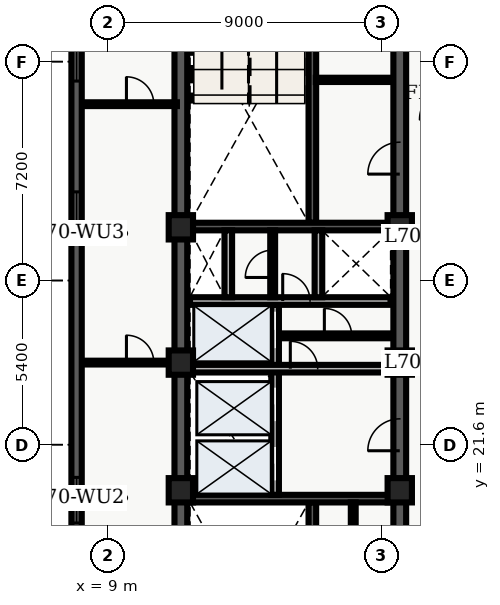
"""IFC4 building model, lengths in metres.
Left out: names, types, materials, properties, quantities, classifications, styles, units other than length and angle.
Written with IfcOpenShell. Run it as: python <this file> out.ifc"""

import sys

from ifc_helpers import new_model, entity, si_unit, converted_unit, direction, frame, origin_with_axes, origin_2d_with_axis, place, context, subcontext, project, spatial, polyline, rectangle, outline, extrude, element, fill, save


model = new_model("IFC4")
c1 = context("Model", 3, precision=1e-05, world=origin_with_axes(), true_north=direction((0.0, 1.0)))
c2 = subcontext(c1, "Body", "Model", "MODEL_VIEW")
j1 = project(units=[si_unit("LENGTHUNIT", "METRE"), converted_unit("PLANEANGLEUNIT", "DEGREE", entity("IfcPlaneAngleMeasure", 0.017), si_unit("PLANEANGLEUNIT", "RADIAN"), dimensions=[0, 0, 0, 0, 0, 0, 0])], contexts=[c1])
p1 = place(None, origin_with_axes())
s1 = spatial("IfcSite", under=j1, at=p1, CompositionType="ELEMENT")
p2 = place(p1, origin_with_axes())
s2 = spatial("IfcBuilding", under=s1, at=p2, CompositionType="ELEMENT")
p3 = place(p2, frame((0.0, 0.0, 284.1), z_axis=(0.0, 0.0, 1.0), x_axis=(1.0, 0.0, 0.0)))
s3 = spatial("IfcBuildingStorey", under=s2, at=p3, CompositionType="ELEMENT", Elevation=284.1)
p4 = place(p3, frame((11.4, 10.8, 0.0), z_axis=(0.0, 0.0, 1.0), x_axis=(0.0, 1.0, 0.0)))
e1 = element("IfcWall", 1, at=p4, inside=s3, PredefinedType="SHEAR", context=c2, shape_type="SweptSolid", body=[
    extrude(outline(polyline([(0.0, -0.21), (27.0, -0.21), (27.0, 0.21), (0.0, 0.21), (0.0, -0.21)])), origin_with_axes(), (0.0, 0.0, 1.0), 3.6),
])
p5 = place(p3, frame((18.6, 10.8, 0.0), z_axis=(0.0, 0.0, 1.0), x_axis=(0.0, 1.0, 0.0)))
e2 = element("IfcWall", 2, at=p5, inside=s3, PredefinedType="SHEAR", context=c2, shape_type="SweptSolid", body=[
    extrude(outline(polyline([(0.0, -0.21), (13.5, -0.21), (13.5, 0.21), (0.0, 0.21), (0.0, -0.21)])), origin_with_axes(), (0.0, 0.0, 1.0), 3.6),
])
p6 = place(p5, frame((1.3, 0.0, 0.0), z_axis=(0.0, 0.0, 1.0), x_axis=(1.0, 0.0, 0.0)))
e3 = element("IfcOpeningElement", 3, at=p6, cuts=e2, PredefinedType="OPENING", context=c2, shape_type="SweptSolid", body=[
    extrude(rectangle(XDim=1.1, YDim=0.44, at=origin_2d_with_axis()), origin_with_axes(), (0.0, 0.0, 1.0), 2.15),
])
p7 = place(p5, frame((3.4, 0.0, 0.0), z_axis=(0.0, 0.0, 1.0), x_axis=(1.0, 0.0, 0.0)))
e4 = element("IfcOpeningElement", 4, at=p7, cuts=e2, PredefinedType="OPENING", context=c2, shape_type="SweptSolid", body=[
    extrude(rectangle(XDim=1.1, YDim=0.44, at=origin_2d_with_axis()), origin_with_axes(), (0.0, 0.0, 1.0), 2.15),
])
p8 = place(p5, frame((11.125, 0.0, 0.0), z_axis=(0.0, 0.0, 1.0), x_axis=(1.0, 0.0, 0.0)))
e5 = element("IfcOpeningElement", 5, at=p8, cuts=e2, PredefinedType="OPENING", context=c2, shape_type="SweptSolid", body=[
    extrude(rectangle(XDim=1.05, YDim=0.44, at=origin_2d_with_axis()), origin_with_axes(), (0.0, 0.0, 1.0), 2.15),
])
p9 = place(p5, frame((6.675, 0.0, 0.0), z_axis=(0.0, 0.0, 1.0), x_axis=(1.0, 0.0, 0.0)))
e6 = element("IfcOpeningElement", 6, at=p9, cuts=e2, PredefinedType="OPENING", context=c2, shape_type="SweptSolid", body=[
    extrude(rectangle(XDim=0.95, YDim=0.44, at=origin_2d_with_axis()), origin_with_axes(), (0.0, 0.0, 1.0), 2.15),
])
p10 = place(p3, frame((18.6, 24.3, 0.0), z_axis=(0.0, 0.0, 1.0), x_axis=(0.0, 1.0, 0.0)))
e7 = element("IfcWall", 7, at=p10, inside=s3, PredefinedType="SHEAR", context=c2, shape_type="SweptSolid", body=[
    extrude(outline(polyline([(0.0, -0.21), (13.5, -0.21), (13.5, 0.21), (0.0, 0.21), (0.0, -0.21)])), origin_with_axes(), (0.0, 0.0, 1.0), 3.6),
])
p11 = place(p10, frame((6.725, 0.0, 0.0), z_axis=(0.0, 0.0, 1.0), x_axis=(1.0, 0.0, 0.0)))
e8 = element("IfcOpeningElement", 8, at=p11, cuts=e7, PredefinedType="OPENING", context=c2, shape_type="SweptSolid", body=[
    extrude(rectangle(XDim=1.05, YDim=0.44, at=origin_2d_with_axis()), origin_with_axes(), (0.0, 0.0, 1.0), 2.15),
])
p12 = place(p10, frame((11.125, 0.0, 0.0), z_axis=(0.0, 0.0, 1.0), x_axis=(1.0, 0.0, 0.0)))
e9 = element("IfcOpeningElement", 9, at=p12, cuts=e7, PredefinedType="OPENING", context=c2, shape_type="SweptSolid", body=[
    extrude(rectangle(XDim=1.05, YDim=0.44, at=origin_2d_with_axis()), origin_with_axes(), (0.0, 0.0, 1.0), 2.15),
])
p13 = place(p3, frame((15.725, 11.01, 0.0), z_axis=(0.0, 0.0, 1.0), x_axis=(0.0, 1.0, 0.0)))
e10 = element("IfcWall", 10, at=p13, inside=s3, PredefinedType="SHEAR", context=c2, shape_type="SweptSolid", body=[
    extrude(outline(polyline([(0.0, -0.125), (8.69, -0.125), (8.69, 0.125), (0.0, 0.125), (0.0, -0.125)])), origin_with_axes(), (0.0, 0.0, 1.0), 3.6),
])
p14 = place(p3, frame((11.61, 19.825, 0.0), z_axis=(0.0, 0.0, 1.0), x_axis=(1.0, 0.0, 0.0)))
e11 = element("IfcWall", 11, at=p14, inside=s3, PredefinedType="SHEAR", context=c2, shape_type="SweptSolid", body=[
    extrude(outline(polyline([(0.0, -0.125), (6.78, -0.125), (6.78, 0.125), (0.0, 0.125), (0.0, -0.125)])), origin_with_axes(), (0.0, 0.0, 1.0), 3.6),
])
p15 = place(p3, frame((15.725, 28.9, 0.0), z_axis=(0.0, 0.0, 1.0), x_axis=(0.0, 1.0, 0.0)))
e12 = element("IfcWall", 12, at=p15, inside=s3, PredefinedType="SHEAR", context=c2, shape_type="SweptSolid", body=[
    extrude(outline(polyline([(0.0, -0.125), (8.69, -0.125), (8.69, 0.125), (0.0, 0.125), (0.0, -0.125)])), origin_with_axes(), (0.0, 0.0, 1.0), 3.6),
])
p16 = place(p3, frame((11.61, 28.775, 0.0), z_axis=(0.0, 0.0, 1.0), x_axis=(1.0, 0.0, 0.0)))
e13 = element("IfcWall", 13, at=p16, inside=s3, PredefinedType="SHEAR", context=c2, shape_type="SweptSolid", body=[
    extrude(outline(polyline([(0.0, -0.125), (6.78, -0.125), (6.78, 0.125), (0.0, 0.125), (0.0, -0.125)])), origin_with_axes(), (0.0, 0.0, 1.0), 3.6),
])
p17 = place(p3, frame((14.5, 19.95, 0.0), z_axis=(0.0, 0.0, 1.0), x_axis=(0.0, 1.0, 0.0)))
e14 = element("IfcWall", 14, at=p17, inside=s3, PredefinedType="SOLIDWALL", context=c2, shape_type="SweptSolid", body=[
    extrude(outline(polyline([(0.0, -0.125), (6.25, -0.125), (6.25, 0.125), (0.0, 0.125), (0.0, -0.125)])), origin_with_axes(), (0.0, 0.0, 1.0), 2.64),
])
p18 = place(p17, frame((1.025, 0.0, 0.0), z_axis=(0.0, 0.0, 1.0), x_axis=(1.0, 0.0, 0.0)))
e15 = element("IfcOpeningElement", 15, at=p18, cuts=e14, PredefinedType="OPENING", context=c2, shape_type="SweptSolid", body=[
    extrude(rectangle(XDim=1.1, YDim=0.27, at=origin_2d_with_axis()), origin_with_axes(), (0.0, 0.0, 1.0), 2.15),
])
p19 = place(p17, frame((2.975, 0.0, 0.0), z_axis=(0.0, 0.0, 1.0), x_axis=(1.0, 0.0, 0.0)))
e16 = element("IfcOpeningElement", 16, at=p19, cuts=e14, PredefinedType="OPENING", context=c2, shape_type="SweptSolid", body=[
    extrude(rectangle(XDim=1.1, YDim=0.27, at=origin_2d_with_axis()), origin_with_axes(), (0.0, 0.0, 1.0), 2.15),
])
p20 = place(p17, frame((5.425, 0.0, 0.0), z_axis=(0.0, 0.0, 1.0), x_axis=(1.0, 0.0, 0.0)))
e17 = element("IfcOpeningElement", 17, at=p20, cuts=e14, PredefinedType="OPENING", context=c2, shape_type="SweptSolid", body=[
    extrude(rectangle(XDim=1.2, YDim=0.27, at=origin_2d_with_axis()), origin_with_axes(), (0.0, 0.0, 1.0), 2.15),
])
p21 = place(p3, frame((11.7, 24.1, 0.0), z_axis=(0.0, 0.0, 1.0), x_axis=(1.0, 0.0, 0.0)))
e18 = element("IfcWall", 18, at=p21, inside=s3, PredefinedType="SOLIDWALL", context=c2, shape_type="SweptSolid", body=[
    extrude(outline(polyline([(0.0, -0.125), (6.6, -0.125), (6.6, 0.125), (0.0, 0.125), (0.0, -0.125)])), origin_with_axes(), (0.0, 0.0, 1.0), 2.64),
])
p22 = place(p21, frame((3.75, 0.0, 0.0), z_axis=(0.0, 0.0, 1.0), x_axis=(1.0, 0.0, 0.0)))
e19 = element("IfcOpeningElement", 19, at=p22, cuts=e18, PredefinedType="OPENING", context=c2, shape_type="SweptSolid", body=[
    extrude(rectangle(XDim=0.9, YDim=0.27, at=origin_2d_with_axis()), origin_with_axes(), (0.0, 0.0, 1.0), 2.15),
])
p23 = place(p3, frame((11.7, 26.325, 0.0), z_axis=(0.0, 0.0, 1.0), x_axis=(1.0, 0.0, 0.0)))
e20 = element("IfcWall", 20, at=p23, inside=s3, PredefinedType="SOLIDWALL", context=c2, shape_type="SweptSolid", body=[
    extrude(outline(polyline([(0.0, -0.125), (6.6, -0.125), (6.6, 0.125), (0.0, 0.125), (0.0, -0.125)])), origin_with_axes(), (0.0, 0.0, 1.0), 2.64),
])
p24 = place(p23, frame((3.5, 0.0, 0.0), z_axis=(0.0, 0.0, 1.0), x_axis=(1.0, 0.0, 0.0)))
e21 = element("IfcOpeningElement", 21, at=p24, cuts=e20, PredefinedType="OPENING", context=c2, shape_type="SweptSolid", body=[
    extrude(rectangle(XDim=0.9, YDim=0.27, at=origin_2d_with_axis()), origin_with_axes(), (0.0, 0.0, 1.0), 2.15),
])
for number, where, z_axis, x_axis in (
    (22, (12.96, 26.45, 0.0), (0.0, 0.0, 1.0), (0.0, 1.0, 0.0)),
    (23, (15.925, 26.45, 0.0), (0.0, 0.0, 1.0), (0.0, 1.0, 0.0)),
):
    element("IfcWall", number, at=place(p3, frame(where, z_axis=z_axis, x_axis=x_axis)), inside=s3, PredefinedType="SOLIDWALL", context=c2, shape_type="SweptSolid", body=[
        extrude(outline(polyline([(0.0, -0.125), (2.2, -0.125), (2.2, 0.125), (0.0, 0.125), (0.0, -0.125)])), origin_with_axes(), (0.0, 0.0, 1.0), 2.64),
    ])
for number, where, z_axis, x_axis in (
    (24, (11.4, 20.1, 0.0), (0.0, 0.0, 1.0), (1.0, 0.0, 0.0)),
    (25, (11.4, 24.3, 0.0), (0.0, 0.0, 1.0), (1.0, 0.0, 0.0)),
    (26, (11.4, 28.75, 0.0), (0.0, 0.0, 1.0), (1.0, 0.0, 0.0)),
    (27, (18.6, 20.1, 0.0), (0.0, 0.0, 1.0), (1.0, 0.0, 0.0)),
    (28, (18.6, 24.3, 0.0), (0.0, 0.0, 1.0), (1.0, 0.0, 0.0)),
    (29, (18.6, 28.75, 0.0), (0.0, 0.0, 1.0), (1.0, 0.0, 0.0)),
):
    element("IfcColumn", number, at=place(p3, frame(where, z_axis=z_axis, x_axis=x_axis)), inside=s3, PredefinedType="COLUMN", context=c2, shape_type="SweptSolid", body=[
        extrude(rectangle(XDim=0.8, YDim=0.8, at=origin_2d_with_axis()), origin_with_axes(), (0.0, 0.0, 1.0), 3.9),
    ])
p25 = place(p3, frame((14.62, 25.18, 0.0), z_axis=(0.0, 0.0, 1.0), x_axis=(1.0, 0.0, 0.0)))
e30 = element("IfcWall", 30, at=p25, inside=s3, PredefinedType="PARTITIONING", context=c2, shape_type="SweptSolid", body=[
    extrude(outline(polyline([(0.0, -0.08), (3.68, -0.08), (3.68, 0.08), (0.0, 0.08), (0.0, -0.08)])), origin_with_axes(), (0.0, 0.0, 1.0), 2.64),
])
p26 = place(p25, frame((1.95, 0.0, 0.0), z_axis=(0.0, 0.0, 1.0), x_axis=(1.0, 0.0, 0.0)))
e31 = element("IfcOpeningElement", 31, at=p26, cuts=e30, PredefinedType="OPENING", context=c2, shape_type="SweptSolid", body=[
    extrude(rectangle(XDim=0.9, YDim=0.18, at=origin_2d_with_axis()), origin_with_axes(), (0.0, 0.0, 1.0), 2.15),
])
p27 = place(p3, frame((14.42, 26.45, 0.0), z_axis=(0.0, 0.0, 1.0), x_axis=(0.0, 1.0, 0.0)))
e32 = element("IfcWall", 32, at=p27, inside=s3, PredefinedType="PARTITIONING", context=c2, shape_type="SweptSolid", body=[
    extrude(outline(polyline([(0.0, -0.08), (2.2, -0.08), (2.2, 0.08), (0.0, 0.08), (0.0, -0.08)])), origin_with_axes(), (0.0, 0.0, 1.0), 2.64),
])
p28 = place(p27, frame((1.1, 0.0, 0.0), z_axis=(0.0, 0.0, 1.0), x_axis=(1.0, 0.0, 0.0)))
e33 = element("IfcOpeningElement", 33, at=p28, cuts=e32, PredefinedType="OPENING", context=c2, shape_type="SweptSolid", body=[
    extrude(rectangle(XDim=0.9, YDim=0.18, at=origin_2d_with_axis()), origin_with_axes(), (0.0, 0.0, 1.0), 2.15),
])
p29 = place(p3, frame((17.07, 15.34, 0.0), z_axis=(0.0, 0.0, 1.0), x_axis=(0.0, 1.0, 0.0)))
e34 = element("IfcWall", 34, at=p29, inside=s3, PredefinedType="PARTITIONING", context=c2, shape_type="SweptSolid", body=[
    extrude(outline(polyline([(0.0, -0.08), (4.36, -0.08), (4.36, 0.08), (0.0, 0.08), (0.0, -0.08)])), origin_with_axes(), (0.0, 0.0, 1.0), 2.64),
])
p30 = place(p29, frame((2.05, 0.0, 0.0), z_axis=(0.0, 0.0, 1.0), x_axis=(1.0, 0.0, 0.0)))
e35 = element("IfcOpeningElement", 35, at=p30, cuts=e34, PredefinedType="OPENING", context=c2, shape_type="SweptSolid", body=[
    extrude(rectangle(XDim=0.9, YDim=0.18, at=origin_2d_with_axis()), origin_with_axes(), (0.0, 0.0, 1.0), 2.15),
])
p31 = place(p3, frame((15.84, 33.6, 0.0), z_axis=(0.0, 0.0, 1.0), x_axis=(1.0, 0.0, 0.0)))
e36 = element("IfcWall", 36, at=p31, inside=s3, PredefinedType="PARTITIONING", context=c2, shape_type="SweptSolid", body=[
    extrude(outline(polyline([(0.0, -0.07), (2.46, -0.07), (2.46, 0.07), (0.0, 0.07), (0.0, -0.07)])), origin_with_axes(), (0.0, 0.0, 1.0), 2.64),
])
p32 = place(p3, frame((8.135, 24.3, 0.0), z_axis=(0.0, 0.0, 1.0), x_axis=(1.0, 0.0, 0.0)))
e37 = element("IfcWall", 37, at=p32, inside=s3, PredefinedType="PARTITIONING", context=c2, shape_type="SweptSolid", body=[
    extrude(outline(polyline([(0.0, -0.062), (3.135, -0.062), (3.135, 0.062), (0.0, 0.062), (0.0, -0.062)])), origin_with_axes(), (0.0, 0.0, 1.0), 2.64),
])
p33 = place(p32, frame((1.925, 0.0, 0.0), z_axis=(0.0, 0.0, 1.0), x_axis=(1.0, 0.0, 0.0)))
e38 = element("IfcOpeningElement", 38, at=p33, cuts=e37, PredefinedType="OPENING", context=c2, shape_type="SweptSolid", body=[
    extrude(rectangle(XDim=0.9, YDim=0.145, at=origin_2d_with_axis()), origin_with_axes(), (0.0, 0.0, 1.0), 2.15),
])
p34 = place(p3, frame((8.135, 32.8, 0.0), z_axis=(0.0, 0.0, 1.0), x_axis=(1.0, 0.0, 0.0)))
e39 = element("IfcWall", 39, at=p34, inside=s3, PredefinedType="PARTITIONING", context=c2, shape_type="SweptSolid", body=[
    extrude(outline(polyline([(0.0, -0.062), (3.135, -0.062), (3.135, 0.062), (0.0, 0.062), (0.0, -0.062)])), origin_with_axes(), (0.0, 0.0, 1.0), 2.64),
])
p35 = place(p34, frame((1.925, 0.0, 0.0), z_axis=(0.0, 0.0, 1.0), x_axis=(1.0, 0.0, 0.0)))
e40 = element("IfcOpeningElement", 40, at=p35, cuts=e39, PredefinedType="OPENING", context=c2, shape_type="SweptSolid", body=[
    extrude(rectangle(XDim=0.9, YDim=0.145, at=origin_2d_with_axis()), origin_with_axes(), (0.0, 0.0, 1.0), 2.15),
])
p36 = place(p3, frame((7.97, 2.74, 0.0), z_axis=(0.0, 0.0, 1.0), x_axis=(0.0, 1.0, 0.0)))
e41 = element("IfcWall", 41, at=p36, inside=s3, PredefinedType="SOLIDWALL", context=c2, shape_type="SweptSolid", body=[
    extrude(outline(polyline([(0.0, -0.17), (43.46, -0.17), (43.46, 0.17), (0.0, 0.17), (0.0, -0.17)])), origin_with_axes(), (0.0, 0.0, 1.0), 3.6),
])
p37 = place(p36, frame((2.948, 0.0, 0.45), z_axis=(0.0, 0.0, 1.0), x_axis=(1.0, 0.0, 0.0)))
e42 = element("IfcOpeningElement", 42, at=p37, cuts=e41, PredefinedType="OPENING", context=c2, shape_type="SweptSolid", body=[
    extrude(rectangle(XDim=1.5, YDim=0.36, at=origin_2d_with_axis()), origin_with_axes(), (0.0, 0.0, 1.0), 2.1),
])
p38 = place(p36, frame((7.643, 0.0, 0.45), z_axis=(0.0, 0.0, 1.0), x_axis=(1.0, 0.0, 0.0)))
e43 = element("IfcOpeningElement", 43, at=p38, cuts=e41, PredefinedType="OPENING", context=c2, shape_type="SweptSolid", body=[
    extrude(rectangle(XDim=1.5, YDim=0.36, at=origin_2d_with_axis()), origin_with_axes(), (0.0, 0.0, 1.0), 2.1),
])
p39 = place(p36, frame((17.034, 0.0, 0.45), z_axis=(0.0, 0.0, 1.0), x_axis=(1.0, 0.0, 0.0)))
e44 = element("IfcOpeningElement", 44, at=p39, cuts=e41, PredefinedType="OPENING", context=c2, shape_type="SweptSolid", body=[
    extrude(rectangle(XDim=1.5, YDim=0.36, at=origin_2d_with_axis()), origin_with_axes(), (0.0, 0.0, 1.0), 2.1),
])
p40 = place(p36, frame((26.426, 0.0, 0.45), z_axis=(0.0, 0.0, 1.0), x_axis=(1.0, 0.0, 0.0)))
e45 = element("IfcOpeningElement", 45, at=p40, cuts=e41, PredefinedType="OPENING", context=c2, shape_type="SweptSolid", body=[
    extrude(rectangle(XDim=1.5, YDim=0.36, at=origin_2d_with_axis()), origin_with_axes(), (0.0, 0.0, 1.0), 2.1),
])
p41 = place(p36, frame((31.571, 0.0, 0.45), z_axis=(0.0, 0.0, 1.0), x_axis=(1.0, 0.0, 0.0)))
e46 = element("IfcOpeningElement", 46, at=p41, cuts=e41, PredefinedType="OPENING", context=c2, shape_type="SweptSolid", body=[
    extrude(rectangle(XDim=1.5, YDim=0.36, at=origin_2d_with_axis()), origin_with_axes(), (0.0, 0.0, 1.0), 2.1),
])
p42 = place(p36, frame((35.817, 0.0, 0.45), z_axis=(0.0, 0.0, 1.0), x_axis=(1.0, 0.0, 0.0)))
e47 = element("IfcOpeningElement", 47, at=p42, cuts=e41, PredefinedType="OPENING", context=c2, shape_type="SweptSolid", body=[
    extrude(rectangle(XDim=1.5, YDim=0.36, at=origin_2d_with_axis()), origin_with_axes(), (0.0, 0.0, 1.0), 2.1),
])
p43 = place(p36, frame((40.512, 0.0, 0.45), z_axis=(0.0, 0.0, 1.0), x_axis=(1.0, 0.0, 0.0)))
e48 = element("IfcOpeningElement", 48, at=p43, cuts=e41, PredefinedType="OPENING", context=c2, shape_type="SweptSolid", body=[
    extrude(rectangle(XDim=1.5, YDim=0.36, at=origin_2d_with_axis()), origin_with_axes(), (0.0, 0.0, 1.0), 2.1),
])
p44 = place(p17, frame((1.025, 0.0, 0.0), z_axis=(0.0, 0.0, 1.0), x_axis=(1.0, 0.0, 0.0)))
e49 = element("IfcDoor", 49, at=p44, inside=s3, OperationType="SLIDING_TO_LEFT", PredefinedType="DOOR", context=c2, shape_type="SweptSolid", body=[
    extrude(rectangle(XDim=1.1, YDim=0.09, at=origin_2d_with_axis()), origin_with_axes(), (0.0, 0.0, 1.0), 2.15),
])
fill(e15, e49)
p45 = place(p17, frame((2.975, 0.0, 0.0), z_axis=(0.0, 0.0, 1.0), x_axis=(1.0, 0.0, 0.0)))
e50 = element("IfcDoor", 50, at=p45, inside=s3, OperationType="SLIDING_TO_RIGHT", PredefinedType="DOOR", context=c2, shape_type="SweptSolid", body=[
    extrude(rectangle(XDim=1.1, YDim=0.09, at=origin_2d_with_axis()), origin_with_axes(), (0.0, 0.0, 1.0), 2.15),
])
fill(e16, e50)
p46 = place(p17, frame((5.425, 0.0, 0.0), z_axis=(0.0, 0.0, 1.0), x_axis=(1.0, 0.0, 0.0)))
e51 = element("IfcDoor", 51, at=p46, inside=s3, OperationType="DOUBLE_DOOR_SLIDING", PredefinedType="DOOR", context=c2, shape_type="SweptSolid", body=[
    extrude(rectangle(XDim=1.2, YDim=0.09, at=origin_2d_with_axis()), origin_with_axes(), (0.0, 0.0, 1.0), 2.15),
])
fill(e17, e51)
p47 = place(p5, frame((11.125, 0.0, 0.0), z_axis=(0.0, 0.0, 1.0), x_axis=(1.0, 0.0, 0.0)))
e52 = element("IfcDoor", 52, at=p47, inside=s3, OperationType="SINGLE_SWING_LEFT", PredefinedType="DOOR", context=c2, shape_type="SweptSolid", body=[
    extrude(rectangle(XDim=1.05, YDim=0.09, at=origin_2d_with_axis()), origin_with_axes(), (0.0, 0.0, 1.0), 2.15),
])
fill(e5, e52)
p48 = place(p23, frame((3.5, 0.0, 0.0), z_axis=(0.0, 0.0, 1.0), x_axis=(1.0, 0.0, 0.0)))
e53 = element("IfcDoor", 53, at=p48, inside=s3, OperationType="SINGLE_SWING_LEFT", PredefinedType="DOOR", context=c2, shape_type="SweptSolid", body=[
    extrude(rectangle(XDim=0.9, YDim=0.09, at=origin_2d_with_axis()), origin_with_axes(), (0.0, 0.0, 1.0), 2.15),
])
fill(e21, e53)
p49 = place(p27, frame((1.1, 0.0, 0.0), z_axis=(0.0, 0.0, 1.0), x_axis=(1.0, 0.0, 0.0)))
e54 = element("IfcDoor", 54, at=p49, inside=s3, OperationType="SINGLE_SWING_LEFT", PredefinedType="DOOR", context=c2, shape_type="SweptSolid", body=[
    extrude(rectangle(XDim=0.9, YDim=0.09, at=origin_2d_with_axis()), origin_with_axes(), (0.0, 0.0, 1.0), 2.15),
])
fill(e33, e54)
p50 = place(p21, frame((3.75, 0.0, 0.0), z_axis=(0.0, 0.0, 1.0), x_axis=(1.0, 0.0, 0.0)))
e55 = element("IfcDoor", 55, at=p50, inside=s3, OperationType="SINGLE_SWING_LEFT", PredefinedType="DOOR", context=c2, shape_type="SweptSolid", body=[
    extrude(rectangle(XDim=0.9, YDim=0.09, at=origin_2d_with_axis()), origin_with_axes(), (0.0, 0.0, 1.0), 2.15),
])
fill(e19, e55)
p51 = place(p25, frame((1.95, 0.0, 0.0), z_axis=(0.0, 0.0, 1.0), x_axis=(1.0, 0.0, 0.0)))
e56 = element("IfcDoor", 56, at=p51, inside=s3, OperationType="SINGLE_SWING_LEFT", PredefinedType="DOOR", context=c2, shape_type="SweptSolid", body=[
    extrude(rectangle(XDim=0.9, YDim=0.09, at=origin_2d_with_axis()), origin_with_axes(), (0.0, 0.0, 1.0), 2.15),
])
fill(e31, e56)
p52 = place(p10, frame((6.725, 0.0, 0.0), z_axis=(0.0, 0.0, 1.0), x_axis=(1.0, 0.0, 0.0)))
e57 = element("IfcDoor", 57, at=p52, inside=s3, OperationType="SINGLE_SWING_LEFT", PredefinedType="DOOR", context=c2, shape_type="SweptSolid", body=[
    extrude(rectangle(XDim=1.05, YDim=0.09, at=origin_2d_with_axis()), origin_with_axes(), (0.0, 0.0, 1.0), 2.15),
])
fill(e8, e57)
p53 = place(p32, frame((1.925, 0.0, 0.0), z_axis=(0.0, 0.0, 1.0), x_axis=(1.0, 0.0, 0.0)))
e58 = element("IfcDoor", 58, at=p53, inside=s3, OperationType="SINGLE_SWING_LEFT", PredefinedType="DOOR", context=c2, shape_type="SweptSolid", body=[
    extrude(rectangle(XDim=0.9, YDim=0.075, at=origin_2d_with_axis()), origin_with_axes(), (0.0, 0.0, 1.0), 2.15),
])
fill(e38, e58)
p54 = place(p34, frame((1.925, 0.0, 0.0), z_axis=(0.0, 0.0, 1.0), x_axis=(1.0, 0.0, 0.0)))
e59 = element("IfcDoor", 59, at=p54, inside=s3, OperationType="SINGLE_SWING_LEFT", PredefinedType="DOOR", context=c2, shape_type="SweptSolid", body=[
    extrude(rectangle(XDim=0.9, YDim=0.075, at=origin_2d_with_axis()), origin_with_axes(), (0.0, 0.0, 1.0), 2.15),
])
fill(e40, e59)
p55 = place(p36, frame((17.034, 0.0, 0.45), z_axis=(0.0, 0.0, 1.0), x_axis=(1.0, 0.0, 0.0)))
e60 = element("IfcWindow", 60, at=p55, inside=s3, PredefinedType="WINDOW", context=c2, shape_type="SweptSolid", body=[
    extrude(rectangle(XDim=1.5, YDim=0.09, at=origin_2d_with_axis()), origin_with_axes(), (0.0, 0.0, 1.0), 2.1),
])
fill(e44, e60)
p56 = place(p36, frame((26.426, 0.0, 0.45), z_axis=(0.0, 0.0, 1.0), x_axis=(1.0, 0.0, 0.0)))
e61 = element("IfcWindow", 61, at=p56, inside=s3, PredefinedType="WINDOW", context=c2, shape_type="SweptSolid", body=[
    extrude(rectangle(XDim=1.5, YDim=0.09, at=origin_2d_with_axis()), origin_with_axes(), (0.0, 0.0, 1.0), 2.1),
])
fill(e45, e61)
p57 = place(p36, frame((31.571, 0.0, 0.45), z_axis=(0.0, 0.0, 1.0), x_axis=(1.0, 0.0, 0.0)))
e62 = element("IfcWindow", 62, at=p57, inside=s3, PredefinedType="WINDOW", context=c2, shape_type="SweptSolid", body=[
    extrude(rectangle(XDim=1.5, YDim=0.09, at=origin_2d_with_axis()), origin_with_axes(), (0.0, 0.0, 1.0), 2.1),
])
fill(e46, e62)
save(model, sys.argv[1])
